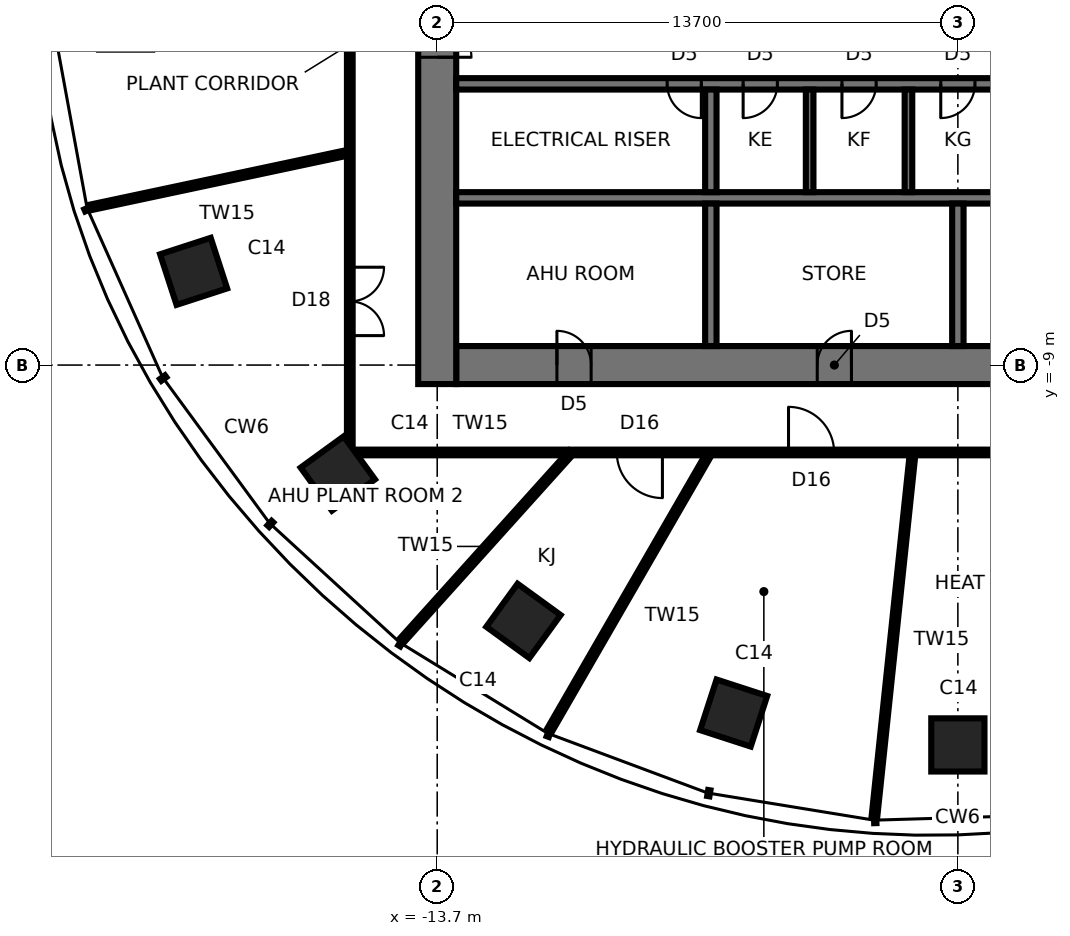
"""IFC4 building model, lengths in metres.
Left out: names, types, materials, properties, quantities, classifications, styles, units other than length and angle.
Written with IfcOpenShell. Run it as: python <this file> out.ifc"""

import sys

from ifc_helpers import new_model, si_unit, direction, frame, frame_2d, origin, origin_2d, place, context, subcontext, project, spatial, rectangle, extrude, element, fill, save


model = new_model("IFC4")
c1 = context("Model", 3, precision=1e-05, world=origin(), true_north=direction((0.0, 1.0)))
c2 = subcontext(c1, "Body", "Model", "MODEL_VIEW")
j1 = project(units=[si_unit("LENGTHUNIT", "METRE"), si_unit("PLANEANGLEUNIT", "RADIAN")], contexts=[c1])
p1 = place(None, origin())
s1 = spatial("IfcSite", under=j1, at=p1, CompositionType="ELEMENT")
p2 = place(p1, origin())
s2 = spatial("IfcBuilding", under=s1, at=p2, CompositionType="ELEMENT")
p3 = place(p2, frame((0.0, 0.0, 246.2)))
s3 = spatial("IfcBuildingStorey", under=s2, at=p3, CompositionType="ELEMENT", Elevation=246.2)
for number, where, z_axis, x_axis in (
    (1, (-20.109, -6.534, 0.0), (0.0, 0.0, 1.0), (-0.951, -0.309, 0.0)),
    (2, (-16.315, -11.854, 0.0), (0.0, 0.0, 1.0), (-0.809, -0.588, 0.0)),
    (3, (-11.43, -15.733, 0.0), (0.0, 0.0, 1.0), (-0.588, -0.809, 0.0)),
    (4, (-5.9, -18.157, 0.0), (0.0, 0.0, 1.0), (-0.309, -0.951, 0.0)),
    (5, (0.0, -18.996, 0.0), (0.0, 0.0, 1.0), (0.0, -1.0, 0.0)),
):
    element("IfcColumn", number, at=place(p3, frame(where, z_axis=z_axis, x_axis=x_axis)), inside=s3, PredefinedType="COLUMN", context=c2, shape_type="SweptSolid", body=[
        extrude(rectangle(XDim=1.4, YDim=1.4, at=origin_2d()), origin(), (0.0, 0.0, 1.0), 5.6),
    ])
p4 = place(p3, frame((-13.2, -9.0, 0.0), z_axis=(0.0, 0.0, 1.0), x_axis=(1.0, 0.0, 0.0)))
e6 = element("IfcWall", 6, at=p4, inside=s3, PredefinedType="SHEAR", context=c2, shape_type="SweptSolid", body=[
    extrude(rectangle(XDim=26.4, YDim=1.0, at=frame_2d((13.2, 0.0))), origin(), (0.0, 0.0, 1.0), 5.6),
])
p5 = place(p4, frame((2.65, 0.0, 0.0)))
e7 = element("IfcOpeningElement", 7, at=p5, cuts=e6, PredefinedType="OPENING", context=c2, shape_type="SweptSolid", body=[
    extrude(rectangle(XDim=0.9, YDim=2.1, at=frame_2d((0.45, 1.05))), frame((0.0, 0.51, 0.0), z_axis=(0.0, -1.0, 0.0), x_axis=(1.0, 0.0, 0.0)), (0.0, 0.0, 1.0), 1.02),
])
p6 = place(p4, frame((9.5, 0.0, 0.0)))
e8 = element("IfcOpeningElement", 8, at=p6, cuts=e6, PredefinedType="OPENING", context=c2, shape_type="SweptSolid", body=[
    extrude(rectangle(XDim=0.9, YDim=2.1, at=frame_2d((0.45, 1.05))), frame((0.0, 0.51, 0.0), z_axis=(0.0, -1.0, 0.0), x_axis=(1.0, 0.0, 0.0)), (0.0, 0.0, 1.0), 1.02),
])
p7 = place(p4, frame((16.0, 0.0, 0.0)))
e9 = element("IfcOpeningElement", 9, at=p7, cuts=e6, PredefinedType="OPENING", context=c2, shape_type="SweptSolid", body=[
    extrude(rectangle(XDim=0.9, YDim=2.1, at=frame_2d((0.45, 1.05))), frame((0.0, 0.51, 0.0), z_axis=(0.0, -1.0, 0.0), x_axis=(1.0, 0.0, 0.0)), (0.0, 0.0, 1.0), 1.02),
])
p8 = place(p4, frame((22.85, 0.0, 0.0)))
e10 = element("IfcOpeningElement", 10, at=p8, cuts=e6, PredefinedType="OPENING", context=c2, shape_type="SweptSolid", body=[
    extrude(rectangle(XDim=0.9, YDim=2.1, at=frame_2d((0.45, 1.05))), frame((0.0, 0.51, 0.0), z_axis=(0.0, -1.0, 0.0), x_axis=(1.0, 0.0, 0.0)), (0.0, 0.0, 1.0), 1.02),
])
p9 = place(p3, frame((-13.7, 9.5, 0.0), z_axis=(0.0, 0.0, 1.0), x_axis=(0.0, -1.0, 0.0)))
e11 = element("IfcWall", 11, at=p9, inside=s3, PredefinedType="SHEAR", context=c2, shape_type="SweptSolid", body=[
    extrude(rectangle(XDim=19.0, YDim=1.0, at=frame_2d((9.5, 0.0))), origin(), (0.0, 0.0, 1.0), 5.6),
])
p10 = place(p9, frame((8.6, 0.0, 0.0)))
e12 = element("IfcOpeningElement", 12, at=p10, cuts=e11, PredefinedType="OPENING", context=c2, shape_type="SweptSolid", body=[
    extrude(rectangle(XDim=1.8, YDim=2.4, at=frame_2d((0.9, 1.2))), frame((0.0, 0.51, 0.0), z_axis=(0.0, -1.0, 0.0), x_axis=(1.0, 0.0, 0.0)), (0.0, 0.0, 1.0), 1.02),
])
p11 = place(p3, frame((-13.2, -1.6, 0.0), z_axis=(0.0, 0.0, 1.0), x_axis=(1.0, 0.0, 0.0)))
e13 = element("IfcWall", 13, at=p11, inside=s3, PredefinedType="SHEAR", context=c2, shape_type="SweptSolid", body=[
    extrude(rectangle(XDim=26.4, YDim=0.3, at=frame_2d((13.2, 0.0))), origin(), (0.0, 0.0, 1.0), 5.6),
])
p12 = place(p11, frame((25.15, 0.0, 0.0)))
e14 = element("IfcOpeningElement", 14, at=p12, cuts=e13, PredefinedType="OPENING", context=c2, shape_type="SweptSolid", body=[
    extrude(rectangle(XDim=1.0, YDim=2.1, at=frame_2d((0.5, 1.05))), frame((0.0, 0.16, 0.0), z_axis=(0.0, -1.0, 0.0), x_axis=(1.0, 0.0, 0.0)), (0.0, 0.0, 1.0), 0.32),
])
p13 = place(p11, frame((7.55, 0.0, 0.0)))
e15 = element("IfcOpeningElement", 15, at=p13, cuts=e13, PredefinedType="OPENING", context=c2, shape_type="SweptSolid", body=[
    extrude(rectangle(XDim=0.9, YDim=2.1, at=frame_2d((0.45, 1.05))), frame((0.0, 0.16, 0.0), z_axis=(0.0, -1.0, 0.0), x_axis=(1.0, 0.0, 0.0)), (0.0, 0.0, 1.0), 0.32),
])
p14 = place(p11, frame((10.15, 0.0, 0.0)))
e16 = element("IfcOpeningElement", 16, at=p14, cuts=e13, PredefinedType="OPENING", context=c2, shape_type="SweptSolid", body=[
    extrude(rectangle(XDim=0.9, YDim=2.1, at=frame_2d((0.45, 1.05))), frame((0.0, 0.16, 0.0), z_axis=(0.0, -1.0, 0.0), x_axis=(1.0, 0.0, 0.0)), (0.0, 0.0, 1.0), 0.32),
])
p15 = place(p11, frame((12.75, 0.0, 0.0)))
e17 = element("IfcOpeningElement", 17, at=p15, cuts=e13, PredefinedType="OPENING", context=c2, shape_type="SweptSolid", body=[
    extrude(rectangle(XDim=0.9, YDim=2.1, at=frame_2d((0.45, 1.05))), frame((0.0, 0.16, 0.0), z_axis=(0.0, -1.0, 0.0), x_axis=(1.0, 0.0, 0.0)), (0.0, 0.0, 1.0), 0.32),
])
p16 = place(p11, frame((15.25, 0.0, 0.0)))
e18 = element("IfcOpeningElement", 18, at=p16, cuts=e13, PredefinedType="OPENING", context=c2, shape_type="SweptSolid", body=[
    extrude(rectangle(XDim=1.1, YDim=2.3, at=frame_2d((0.55, 1.15))), frame((0.0, 0.16, 0.0), z_axis=(0.0, -1.0, 0.0), x_axis=(1.0, 0.0, 0.0)), (0.0, 0.0, 1.0), 0.32),
])
p17 = place(p11, frame((17.85, 0.0, 0.0)))
e19 = element("IfcOpeningElement", 19, at=p17, cuts=e13, PredefinedType="OPENING", context=c2, shape_type="SweptSolid", body=[
    extrude(rectangle(XDim=1.1, YDim=2.3, at=frame_2d((0.55, 1.15))), frame((0.0, 0.16, 0.0), z_axis=(0.0, -1.0, 0.0), x_axis=(1.0, 0.0, 0.0)), (0.0, 0.0, 1.0), 0.32),
])
p18 = place(p11, frame((5.55, 0.0, 0.0)))
e20 = element("IfcOpeningElement", 20, at=p18, cuts=e13, PredefinedType="OPENING", context=c2, shape_type="SweptSolid", body=[
    extrude(rectangle(XDim=0.9, YDim=2.1, at=frame_2d((0.45, 1.05))), frame((0.0, 0.16, 0.0), z_axis=(0.0, -1.0, 0.0), x_axis=(1.0, 0.0, 0.0)), (0.0, 0.0, 1.0), 0.32),
])
p19 = place(p3, frame((-13.2, -4.6, 0.0), z_axis=(0.0, 0.0, 1.0), x_axis=(1.0, 0.0, 0.0)))
e21 = element("IfcWall", 21, at=p19, inside=s3, PredefinedType="SHEAR", context=c2, shape_type="SweptSolid", body=[
    extrude(rectangle(XDim=26.4, YDim=0.3, at=frame_2d((13.2, 0.0))), origin(), (0.0, 0.0, 1.0), 5.6),
])
p20 = place(p3, frame((-6.5, -1.75, 0.0), z_axis=(0.0, 0.0, 1.0), x_axis=(0.0, -1.0, 0.0)))
e22 = element("IfcWall", 22, at=p20, inside=s3, PredefinedType="SHEAR", context=c2, shape_type="SweptSolid", body=[
    extrude(rectangle(XDim=2.7, YDim=0.3, at=frame_2d((1.35, 0.0))), origin(), (0.0, 0.0, 1.0), 5.6),
])
p21 = place(p3, frame((-6.5, -4.75, 0.0), z_axis=(0.0, 0.0, 1.0), x_axis=(0.0, -1.0, 0.0)))
e23 = element("IfcWall", 23, at=p21, inside=s3, PredefinedType="SHEAR", context=c2, shape_type="SweptSolid", body=[
    extrude(rectangle(XDim=3.75, YDim=0.3, at=frame_2d((1.875, 0.0))), origin(), (0.0, 0.0, 1.0), 5.6),
])
for number, where, z_axis, x_axis in (
    (24, (-3.9, -1.75, 0.0), (0.0, 0.0, 1.0), (0.0, -1.0, 0.0)),
    (25, (-1.3, -1.75, 0.0), (0.0, 0.0, 1.0), (0.0, -1.0, 0.0)),
):
    element("IfcWall", number, at=place(p3, frame(where, z_axis=z_axis, x_axis=x_axis)), inside=s3, PredefinedType="SHEAR", context=c2, shape_type="SweptSolid", body=[
        extrude(rectangle(XDim=2.7, YDim=0.2, at=frame_2d((1.35, 0.0))), origin(), (0.0, 0.0, 1.0), 5.6),
    ])
p22 = place(p3, frame((0.0, -4.75, 0.0), z_axis=(0.0, 0.0, 1.0), x_axis=(0.0, -1.0, 0.0)))
e26 = element("IfcWall", 26, at=p22, inside=s3, PredefinedType="SHEAR", context=c2, shape_type="SweptSolid", body=[
    extrude(rectangle(XDim=3.75, YDim=0.3, at=frame_2d((1.875, 0.0))), origin(), (0.0, 0.0, 1.0), 5.6),
])
p23 = place(p3, frame((-16.0, -3.401, 0.0), z_axis=(0.0, 0.0, 1.0), x_axis=(-0.978145707098, -0.207920599476, 0.0)))
e27 = element("IfcWall", 27, at=p23, inside=s3, PredefinedType="PARTITIONING", context=c2, shape_type="SweptSolid", body=[
    extrude(rectangle(XDim=6.988, YDim=0.15, at=frame_2d((3.494, 0.0))), origin(), (0.0, 0.0, 1.0), 5.4),
])
p24 = place(p3, frame((-10.175, -11.3, 0.0), z_axis=(0.0, 0.0, 1.0), x_axis=(-0.669116748293, -0.743157303102, 0.0)))
e28 = element("IfcWall", 28, at=p24, inside=s3, PredefinedType="PARTITIONING", context=c2, shape_type="SweptSolid", body=[
    extrude(rectangle(XDim=6.654, YDim=0.15, at=frame_2d((3.327, 0.0))), origin(), (0.0, 0.0, 1.0), 5.4),
])
p25 = place(p3, frame((-6.524, -11.3, 0.0), z_axis=(0.0, 0.0, 1.0), x_axis=(-0.500005748546, -0.866022084834, 0.0)))
e29 = element("IfcWall", 29, at=p25, inside=s3, PredefinedType="PARTITIONING", context=c2, shape_type="SweptSolid", body=[
    extrude(rectangle(XDim=8.455, YDim=0.15, at=frame_2d((4.227, 0.0))), origin(), (0.0, 0.0, 1.0), 5.4),
])
p26 = place(p3, frame((-1.188, -11.3, 0.0), z_axis=(0.0, 0.0, 1.0), x_axis=(-0.10452541089, -0.994522216181, 0.0)))
e30 = element("IfcWall", 30, at=p26, inside=s3, PredefinedType="PARTITIONING", context=c2, shape_type="SweptSolid", body=[
    extrude(rectangle(XDim=9.649, YDim=0.15, at=frame_2d((4.824, 0.0))), origin(), (0.0, 0.0, 1.0), 5.4),
])
p27 = place(p3, frame((-16.0, -11.3, 0.0), z_axis=(0.0, 0.0, 1.0), x_axis=(1.0, 0.0, 0.0)))
e31 = element("IfcWall", 31, at=p27, inside=s3, PredefinedType="PARTITIONING", context=c2, shape_type="SweptSolid", body=[
    extrude(rectangle(XDim=32.0, YDim=0.15, at=frame_2d((16.0, 0.0))), origin(), (0.0, 0.0, 1.0), 5.4),
])
p28 = place(p27, frame((7.026, 0.0, 0.0)))
e32 = element("IfcOpeningElement", 32, at=p28, cuts=e31, PredefinedType="OPENING", context=c2, shape_type="SweptSolid", body=[
    extrude(rectangle(XDim=1.2, YDim=2.1, at=frame_2d((0.6, 1.05))), frame((0.0, 0.085, 0.0), z_axis=(0.0, -1.0, 0.0), x_axis=(1.0, 0.0, 0.0)), (0.0, 0.0, 1.0), 0.17),
])
p29 = place(p27, frame((11.544, 0.0, 0.0)))
e33 = element("IfcOpeningElement", 33, at=p29, cuts=e31, PredefinedType="OPENING", context=c2, shape_type="SweptSolid", body=[
    extrude(rectangle(XDim=1.2, YDim=2.1, at=frame_2d((0.6, 1.05))), frame((0.0, 0.085, 0.0), z_axis=(0.0, -1.0, 0.0), x_axis=(1.0, 0.0, 0.0)), (0.0, 0.0, 1.0), 0.17),
])
p30 = place(p27, frame((18.068, 0.0, 0.0)))
e34 = element("IfcOpeningElement", 34, at=p30, cuts=e31, PredefinedType="OPENING", context=c2, shape_type="SweptSolid", body=[
    extrude(rectangle(XDim=1.2, YDim=2.1, at=frame_2d((0.6, 1.05))), frame((0.0, 0.085, 0.0), z_axis=(0.0, -1.0, 0.0), x_axis=(1.0, 0.0, 0.0)), (0.0, 0.0, 1.0), 0.17),
])
p31 = place(p27, frame((26.387, 0.0, 0.0)))
e35 = element("IfcOpeningElement", 35, at=p31, cuts=e31, PredefinedType="OPENING", context=c2, shape_type="SweptSolid", body=[
    extrude(rectangle(XDim=1.8, YDim=2.4, at=frame_2d((0.9, 1.2))), frame((0.0, 0.085, 0.0), z_axis=(0.0, -1.0, 0.0), x_axis=(1.0, 0.0, 0.0)), (0.0, 0.0, 1.0), 0.17),
])
p32 = place(p3, frame((-16.0, 11.3, 0.0), z_axis=(0.0, 0.0, 1.0), x_axis=(0.0, -1.0, 0.0)))
e36 = element("IfcWall", 36, at=p32, inside=s3, PredefinedType="PARTITIONING", context=c2, shape_type="SweptSolid", body=[
    extrude(rectangle(XDim=22.6, YDim=0.15, at=frame_2d((11.3, 0.0))), origin(), (0.0, 0.0, 1.0), 5.4),
])
p33 = place(p32, frame((8.539, 0.0, 0.0)))
e37 = element("IfcOpeningElement", 37, at=p33, cuts=e36, PredefinedType="OPENING", context=c2, shape_type="SweptSolid", body=[
    extrude(rectangle(XDim=1.8, YDim=2.4, at=frame_2d((0.9, 1.2))), frame((0.0, 0.085, 0.0), z_axis=(0.0, -1.0, 0.0), x_axis=(1.0, 0.0, 0.0)), (0.0, 0.0, 1.0), 0.17),
])
p34 = place(p32, frame((17.725, 0.0, 0.0)))
e38 = element("IfcOpeningElement", 38, at=p34, cuts=e36, PredefinedType="OPENING", context=c2, shape_type="SweptSolid", body=[
    extrude(rectangle(XDim=1.8, YDim=2.4, at=frame_2d((0.9, 1.2))), frame((0.0, 0.085, 0.0), z_axis=(0.0, -1.0, 0.0), x_axis=(1.0, 0.0, 0.0)), (0.0, 0.0, 1.0), 0.17),
])
p35 = place(p10, origin())
e39 = element("IfcDoor", 39, at=p35, inside=s3, OperationType="DOUBLE_DOOR_SINGLE_SWING", PredefinedType="DOOR", context=c2, shape_type="SweptSolid", body=[
    extrude(rectangle(XDim=1.72, YDim=2.36, at=frame_2d((0.9, 1.18))), frame((0.0, 0.025, 0.0), z_axis=(0.0, -1.0, 0.0), x_axis=(1.0, 0.0, 0.0)), (0.0, 0.0, 1.0), 0.05),
    extrude(rectangle(XDim=0.04, YDim=2.4, at=frame_2d((0.02, 1.2))), frame((0.0, 0.25, 0.0), z_axis=(0.0, -1.0, 0.0), x_axis=(1.0, 0.0, 0.0)), (0.0, 0.0, 1.0), 0.5),
    extrude(rectangle(XDim=0.04, YDim=2.4, at=frame_2d((1.78, 1.2))), frame((0.0, 0.25, 0.0), z_axis=(0.0, -1.0, 0.0), x_axis=(1.0, 0.0, 0.0)), (0.0, 0.0, 1.0), 0.5),
    extrude(rectangle(XDim=1.72, YDim=0.04, at=frame_2d((0.9, 2.38))), frame((0.0, 0.25, 0.0), z_axis=(0.0, -1.0, 0.0), x_axis=(1.0, 0.0, 0.0)), (0.0, 0.0, 1.0), 0.5),
])
fill(e12, e39)
p36 = place(p13, frame((0.9, 0.0, 0.0), z_axis=(0.0, 0.0, 1.0), x_axis=(-1.0, 0.0, 0.0)))
e40 = element("IfcDoor", 40, at=p36, inside=s3, OperationType="SINGLE_SWING_RIGHT", PredefinedType="DOOR", context=c2, shape_type="SweptSolid", body=[
    extrude(rectangle(XDim=0.9, YDim=2.1, at=frame_2d((0.45, 1.05))), frame((0.0, 0.025, 0.0), z_axis=(0.0, -1.0, 0.0), x_axis=(1.0, 0.0, 0.0)), (0.0, 0.0, 1.0), 0.05),
])
fill(e15, e40)
p37 = place(p14, frame((0.9, 0.0, 0.0), z_axis=(0.0, 0.0, 1.0), x_axis=(-1.0, 0.0, 0.0)))
e41 = element("IfcDoor", 41, at=p37, inside=s3, OperationType="SINGLE_SWING_RIGHT", PredefinedType="DOOR", context=c2, shape_type="SweptSolid", body=[
    extrude(rectangle(XDim=0.9, YDim=2.1, at=frame_2d((0.45, 1.05))), frame((0.0, 0.025, 0.0), z_axis=(0.0, -1.0, 0.0), x_axis=(1.0, 0.0, 0.0)), (0.0, 0.0, 1.0), 0.05),
])
fill(e16, e41)
p38 = place(p15, frame((0.9, 0.0, 0.0), z_axis=(0.0, 0.0, 1.0), x_axis=(-1.0, 0.0, 0.0)))
e42 = element("IfcDoor", 42, at=p38, inside=s3, OperationType="SINGLE_SWING_RIGHT", PredefinedType="DOOR", context=c2, shape_type="SweptSolid", body=[
    extrude(rectangle(XDim=0.9, YDim=2.1, at=frame_2d((0.45, 1.05))), frame((0.0, 0.025, 0.0), z_axis=(0.0, -1.0, 0.0), x_axis=(1.0, 0.0, 0.0)), (0.0, 0.0, 1.0), 0.05),
])
fill(e17, e42)
p39 = place(p18, frame((0.9, 0.0, 0.0), z_axis=(0.0, 0.0, 1.0), x_axis=(-1.0, 0.0, 0.0)))
e43 = element("IfcDoor", 43, at=p39, inside=s3, OperationType="SINGLE_SWING_LEFT", PredefinedType="DOOR", context=c2, shape_type="SweptSolid", body=[
    extrude(rectangle(XDim=0.9, YDim=2.1, at=frame_2d((0.45, 1.05))), frame((0.0, 0.025, 0.0), z_axis=(0.0, -1.0, 0.0), x_axis=(1.0, 0.0, 0.0)), (0.0, 0.0, 1.0), 0.05),
])
fill(e20, e43)
p40 = place(p5, origin())
e44 = element("IfcDoor", 44, at=p40, inside=s3, OperationType="SINGLE_SWING_LEFT", PredefinedType="DOOR", context=c2, shape_type="SweptSolid", body=[
    extrude(rectangle(XDim=0.82, YDim=2.06, at=frame_2d((0.45, 1.03))), frame((0.0, 0.025, 0.0), z_axis=(0.0, -1.0, 0.0), x_axis=(1.0, 0.0, 0.0)), (0.0, 0.0, 1.0), 0.05),
    extrude(rectangle(XDim=0.04, YDim=2.1, at=frame_2d((0.02, 1.05))), frame((0.0, 0.25, 0.0), z_axis=(0.0, -1.0, 0.0), x_axis=(1.0, 0.0, 0.0)), (0.0, 0.0, 1.0), 0.5),
    extrude(rectangle(XDim=0.04, YDim=2.1, at=frame_2d((0.88, 1.05))), frame((0.0, 0.25, 0.0), z_axis=(0.0, -1.0, 0.0), x_axis=(1.0, 0.0, 0.0)), (0.0, 0.0, 1.0), 0.5),
    extrude(rectangle(XDim=0.82, YDim=0.04, at=frame_2d((0.45, 2.08))), frame((0.0, 0.25, 0.0), z_axis=(0.0, -1.0, 0.0), x_axis=(1.0, 0.0, 0.0)), (0.0, 0.0, 1.0), 0.5),
])
fill(e7, e44)
p41 = place(p6, origin())
e45 = element("IfcDoor", 45, at=p41, inside=s3, OperationType="SINGLE_SWING_RIGHT", PredefinedType="DOOR", context=c2, shape_type="SweptSolid", body=[
    extrude(rectangle(XDim=0.82, YDim=2.06, at=frame_2d((0.45, 1.03))), frame((0.0, 0.025, 0.0), z_axis=(0.0, -1.0, 0.0), x_axis=(1.0, 0.0, 0.0)), (0.0, 0.0, 1.0), 0.05),
    extrude(rectangle(XDim=0.04, YDim=2.1, at=frame_2d((0.02, 1.05))), frame((0.0, 0.25, 0.0), z_axis=(0.0, -1.0, 0.0), x_axis=(1.0, 0.0, 0.0)), (0.0, 0.0, 1.0), 0.5),
    extrude(rectangle(XDim=0.04, YDim=2.1, at=frame_2d((0.88, 1.05))), frame((0.0, 0.25, 0.0), z_axis=(0.0, -1.0, 0.0), x_axis=(1.0, 0.0, 0.0)), (0.0, 0.0, 1.0), 0.5),
    extrude(rectangle(XDim=0.82, YDim=0.04, at=frame_2d((0.45, 2.08))), frame((0.0, 0.25, 0.0), z_axis=(0.0, -1.0, 0.0), x_axis=(1.0, 0.0, 0.0)), (0.0, 0.0, 1.0), 0.5),
])
fill(e8, e45)
p42 = place(p34, origin())
e46 = element("IfcDoor", 46, at=p42, inside=s3, OperationType="DOUBLE_DOOR_SINGLE_SWING", PredefinedType="DOOR", context=c2, shape_type="SweptSolid", body=[
    extrude(rectangle(XDim=1.8, YDim=2.4, at=frame_2d((0.9, 1.2))), frame((0.0, 0.025, 0.0), z_axis=(0.0, -1.0, 0.0), x_axis=(1.0, 0.0, 0.0)), (0.0, 0.0, 1.0), 0.05),
])
fill(e38, e46)
p43 = place(p28, frame((1.2, 0.0, 0.0), z_axis=(0.0, 0.0, 1.0), x_axis=(-1.0, 0.0, 0.0)))
e47 = element("IfcDoor", 47, at=p43, inside=s3, OperationType="SINGLE_SWING_LEFT", PredefinedType="DOOR", context=c2, shape_type="SweptSolid", body=[
    extrude(rectangle(XDim=1.2, YDim=2.1, at=frame_2d((0.6, 1.05))), frame((0.0, 0.025, 0.0), z_axis=(0.0, -1.0, 0.0), x_axis=(1.0, 0.0, 0.0)), (0.0, 0.0, 1.0), 0.05),
])
fill(e32, e47)
p44 = place(p29, origin())
e48 = element("IfcDoor", 48, at=p44, inside=s3, OperationType="SINGLE_SWING_LEFT", PredefinedType="DOOR", context=c2, shape_type="SweptSolid", body=[
    extrude(rectangle(XDim=1.2, YDim=2.1, at=frame_2d((0.6, 1.05))), frame((0.0, 0.025, 0.0), z_axis=(0.0, -1.0, 0.0), x_axis=(1.0, 0.0, 0.0)), (0.0, 0.0, 1.0), 0.05),
])
fill(e33, e48)
save(model, sys.argv[1])
